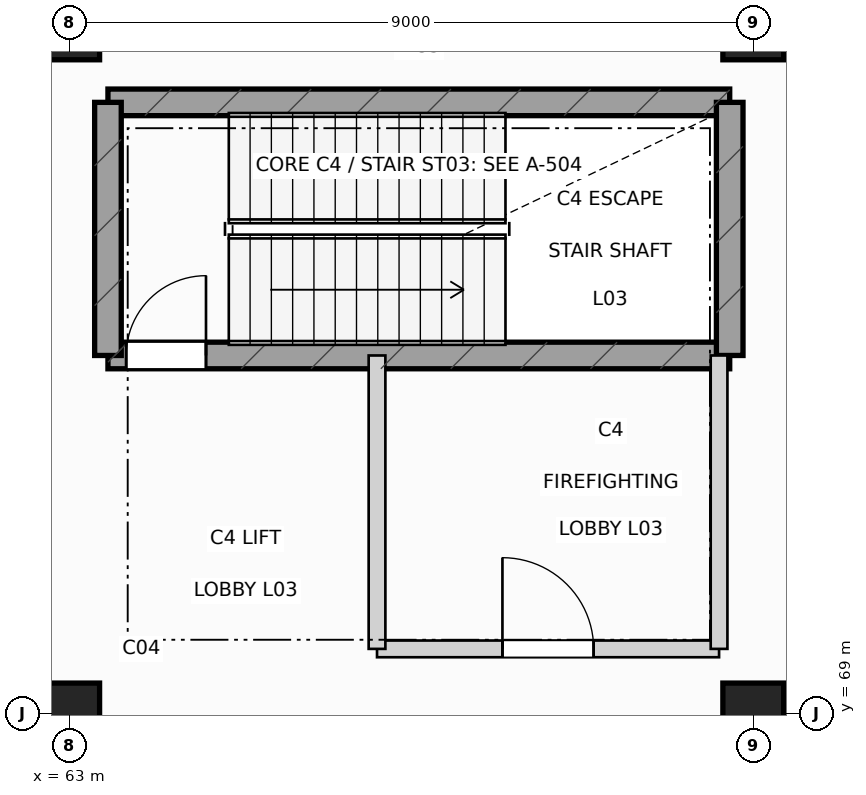
"""IFC4 building model, lengths in metres.
Left out: names, types, materials, properties, quantities, classifications, styles, units other than length and angle.
Written with IfcOpenShell. Run it as: python <this file> out.ifc"""

import sys

from ifc_helpers import new_model, si_unit, direction, frame, frame_2d, origin, origin_2d, place, context, subcontext, project, spatial, rectangle, extrude, element, fill, save


model = new_model("IFC4")
c1 = context("Model", 3, precision=1e-05, world=origin(), true_north=direction((0.0, 1.0)))
c2 = subcontext(c1, "Body", "Model", "MODEL_VIEW")
j1 = project(units=[si_unit("LENGTHUNIT", "METRE"), si_unit("PLANEANGLEUNIT", "RADIAN")], contexts=[c1])
p1 = place(None, origin())
s1 = spatial("IfcSite", under=j1, at=p1, CompositionType="ELEMENT")
p2 = place(p1, origin())
s2 = spatial("IfcBuilding", under=s1, at=p2, CompositionType="ELEMENT")
p3 = place(p2, frame((0.0, 0.0, 16.8)))
s3 = spatial("IfcBuildingStorey", under=s2, at=p3, CompositionType="ELEMENT", Elevation=16.8)
for number, where, z_axis, x_axis in (
    (1, (63.0, 69.0, 0.0), (0.0, 0.0, 1.0), (1.0, 0.0, 0.0)),
    (2, (63.0, 78.0, 0.0), (0.0, 0.0, 1.0), (1.0, 0.0, 0.0)),
    (3, (72.0, 69.0, 0.0), (0.0, 0.0, 1.0), (1.0, 0.0, 0.0)),
    (4, (72.0, 78.0, 0.0), (0.0, 0.0, 1.0), (1.0, 0.0, 0.0)),
):
    element("IfcColumn", number, at=place(p3, frame(where, z_axis=z_axis, x_axis=x_axis)), inside=s3, PredefinedType="COLUMN", context=c2, shape_type="SweptSolid", body=[
        extrude(rectangle(XDim=0.8, YDim=0.8, at=origin_2d()), origin(), (0.0, 0.0, 1.0), 4.8),
    ])
p4 = place(p3, frame((63.51, 73.71, 0.0), z_axis=(0.0, 0.0, 1.0), x_axis=(1.0, 0.0, 0.0)))
e5 = element("IfcWall", 5, at=p4, inside=s3, PredefinedType="SHEAR", context=c2, shape_type="SweptSolid", body=[
    extrude(rectangle(XDim=8.18, YDim=0.35, at=frame_2d((4.09, 0.0))), origin(), (0.0, 0.0, 1.0), 4.52),
])
p5 = place(p4, frame((0.24, 0.0, 0.0)))
e6 = element("IfcOpeningElement", 6, at=p5, cuts=e5, PredefinedType="OPENING", context=c2, shape_type="SweptSolid", body=[
    extrude(rectangle(XDim=1.05, YDim=2.18, at=frame_2d((0.525, 1.09))), frame((0.0, 0.185, 0.0), z_axis=(0.0, -1.0, 0.0), x_axis=(1.0, 0.0, 0.0)), (0.0, 0.0, 1.0), 0.37),
])
p6 = place(p3, frame((63.51, 77.04, 0.0), z_axis=(0.0, 0.0, 1.0), x_axis=(1.0, 0.0, 0.0)))
e7 = element("IfcWall", 7, at=p6, inside=s3, PredefinedType="SHEAR", context=c2, shape_type="SweptSolid", body=[
    extrude(rectangle(XDim=8.18, YDim=0.35, at=frame_2d((4.09, 0.0))), origin(), (0.0, 0.0, 1.0), 4.52),
])
for number, where, z_axis, x_axis in (
    (8, (63.51, 73.71, 0.0), (0.0, 0.0, 1.0), (0.0, 1.0, 0.0)),
    (9, (71.69, 73.71, 0.0), (0.0, 0.0, 1.0), (0.0, 1.0, 0.0)),
):
    element("IfcWall", number, at=place(p3, frame(where, z_axis=z_axis, x_axis=x_axis)), inside=s3, PredefinedType="SHEAR", context=c2, shape_type="SweptSolid", body=[
        extrude(rectangle(XDim=3.33, YDim=0.35, at=frame_2d((1.665, 0.0))), origin(), (0.0, 0.0, 1.0), 4.52),
    ])
p7 = place(p3, frame((67.05, 69.85, 0.0), z_axis=(0.0, 0.0, 1.0), x_axis=(1.0, 0.0, 0.0)))
e10 = element("IfcWall", 10, at=p7, inside=s3, PredefinedType="PARTITIONING", context=c2, shape_type="SweptSolid", body=[
    extrude(rectangle(XDim=4.5, YDim=0.22, at=frame_2d((2.25, 0.0))), origin(), (0.0, 0.0, 1.0), 4.155),
])
p8 = place(p7, frame((1.65, 0.0, 0.0)))
e11 = element("IfcOpeningElement", 11, at=p8, cuts=e10, PredefinedType="OPENING", context=c2, shape_type="SweptSolid", body=[
    extrude(rectangle(XDim=1.2, YDim=2.18, at=frame_2d((0.6, 1.09))), frame((0.0, 0.12, 0.0), z_axis=(0.0, -1.0, 0.0), x_axis=(1.0, 0.0, 0.0)), (0.0, 0.0, 1.0), 0.24),
])
for number, where, z_axis, x_axis in (
    (12, (67.05, 69.85, 0.0), (0.0, 0.0, 1.0), (0.0, 1.0, 0.0)),
    (13, (71.55, 69.85, 0.0), (0.0, 0.0, 1.0), (0.0, 1.0, 0.0)),
):
    element("IfcWall", number, at=place(p3, frame(where, z_axis=z_axis, x_axis=x_axis)), inside=s3, PredefinedType="PARTITIONING", context=c2, shape_type="SweptSolid", body=[
        extrude(rectangle(XDim=3.86, YDim=0.22, at=frame_2d((1.93, 0.0))), origin(), (0.0, 0.0, 1.0), 4.085),
    ])
p9 = place(p5, origin())
e14 = element("IfcDoor", 14, at=p9, inside=s3, OperationType="SINGLE_SWING_RIGHT", PredefinedType="DOOR", context=c2, shape_type="SweptSolid", body=[
    extrude(rectangle(XDim=1.05, YDim=2.18, at=frame_2d((0.525, 1.09))), frame((0.0, 0.025, 0.0), z_axis=(0.0, -1.0, 0.0), x_axis=(1.0, 0.0, 0.0)), (0.0, 0.0, 1.0), 0.05),
])
fill(e6, e14)
p10 = place(p8, origin())
e15 = element("IfcDoor", 15, at=p10, inside=s3, OperationType="SINGLE_SWING_LEFT", PredefinedType="DOOR", context=c2, shape_type="SweptSolid", body=[
    extrude(rectangle(XDim=1.2, YDim=2.18, at=frame_2d((0.6, 1.09))), frame((0.0, 0.025, 0.0), z_axis=(0.0, -1.0, 0.0), x_axis=(1.0, 0.0, 0.0)), (0.0, 0.0, 1.0), 0.05),
])
fill(e11, e15)
save(model, sys.argv[1])
